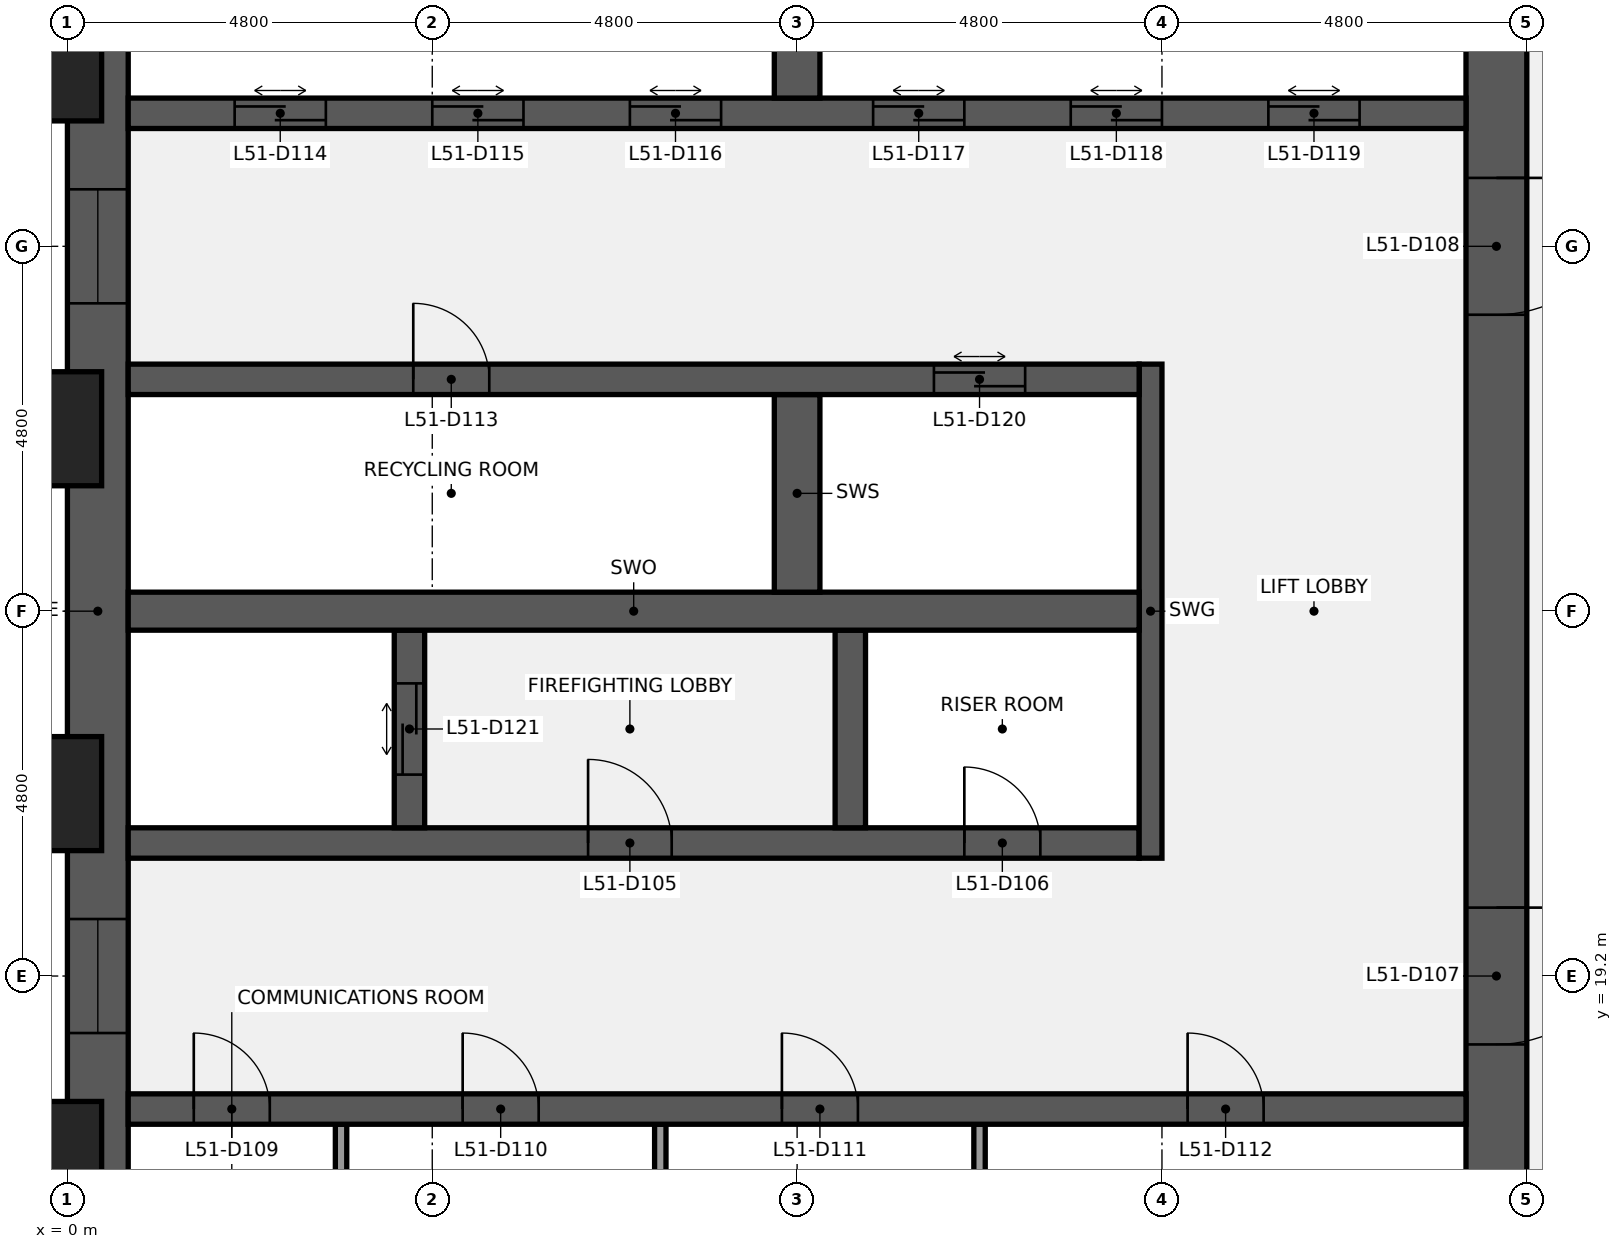
"""IFC4 building model, lengths in metres.
Left out: names, types, materials, properties, quantities, classifications, styles, units other than length and angle.
Written with IfcOpenShell. Run it as: python <this file> out.ifc"""

import sys

from ifc_helpers import new_model, si_unit, direction, frame, frame_2d, origin, origin_2d, place, context, subcontext, project, spatial, rectangle, extrude, element, fill, save


model = new_model("IFC4")
c1 = context("Model", 3, precision=1e-05, world=origin(), true_north=direction((0.0, 1.0)))
c2 = subcontext(c1, "Body", "Model", "MODEL_VIEW")
j1 = project(units=[si_unit("LENGTHUNIT", "METRE"), si_unit("PLANEANGLEUNIT", "RADIAN")], contexts=[c1])
p1 = place(None, origin())
s1 = spatial("IfcSite", under=j1, at=p1, CompositionType="ELEMENT")
p2 = place(p1, origin())
s2 = spatial("IfcBuilding", under=s1, at=p2, CompositionType="ELEMENT")
p3 = place(p2, frame((0.0, 0.0, 233.2)))
s3 = spatial("IfcBuildingStorey", under=s2, at=p3, CompositionType="ELEMENT", Elevation=233.2)
p4 = place(p3, frame((0.4, 9.6, 0.0), z_axis=(0.0, 0.0, 1.0), x_axis=(0.0, 1.0, 0.0)))
e1 = element("IfcWall", 1, at=p4, inside=s3, PredefinedType="SHEAR", context=c2, shape_type="SweptSolid", body=[
    extrude(rectangle(XDim=28.8, YDim=0.8, at=frame_2d((14.4, 0.0))), origin(), (0.0, 0.0, 1.0), 3.84),
])
p5 = place(p4, frame((8.85, 0.0, 0.9)))
e2 = element("IfcOpeningElement", 2, at=p5, cuts=e1, PredefinedType="OPENING", context=c2, shape_type="SweptSolid", body=[
    extrude(rectangle(XDim=1.5, YDim=1.5, at=frame_2d((0.75, 0.75))), frame((0.0, 0.41, 0.0), z_axis=(0.0, -1.0, 0.0), x_axis=(1.0, 0.0, 0.0)), (0.0, 0.0, 1.0), 0.82),
])
p6 = place(p4, frame((18.45, 0.0, 0.9)))
e3 = element("IfcOpeningElement", 3, at=p6, cuts=e1, PredefinedType="OPENING", context=c2, shape_type="SweptSolid", body=[
    extrude(rectangle(XDim=1.5, YDim=1.5, at=frame_2d((0.75, 0.75))), frame((0.0, 0.41, 0.0), z_axis=(0.0, -1.0, 0.0), x_axis=(1.0, 0.0, 0.0)), (0.0, 0.0, 1.0), 0.82),
])
p7 = place(p3, frame((18.8, 38.4, 0.0), z_axis=(0.0, 0.0, 1.0), x_axis=(0.0, -1.0, 0.0)))
e4 = element("IfcWall", 4, at=p7, inside=s3, PredefinedType="SHEAR", context=c2, shape_type="SweptSolid", body=[
    extrude(rectangle(XDim=28.8, YDim=0.8, at=frame_2d((14.4, 0.0))), origin(), (0.0, 0.0, 1.0), 3.84),
])
p8 = place(p7, frame((18.3, 0.0, 0.0)))
e5 = element("IfcOpeningElement", 5, at=p8, cuts=e4, PredefinedType="OPENING", context=c2, shape_type="SweptSolid", body=[
    extrude(rectangle(XDim=1.8, YDim=2.1, at=frame_2d((0.9, 1.05))), frame((0.0, 0.41, 0.0), z_axis=(0.0, -1.0, 0.0), x_axis=(1.0, 0.0, 0.0)), (0.0, 0.0, 1.0), 0.82),
])
p9 = place(p7, frame((8.7, 0.0, 0.0)))
e6 = element("IfcOpeningElement", 6, at=p9, cuts=e4, PredefinedType="OPENING", context=c2, shape_type="SweptSolid", body=[
    extrude(rectangle(XDim=1.8, YDim=2.1, at=frame_2d((0.9, 1.05))), frame((0.0, 0.41, 0.0), z_axis=(0.0, -1.0, 0.0), x_axis=(1.0, 0.0, 0.0)), (0.0, 0.0, 1.0), 0.82),
])
for number, where, z_axis, x_axis in (
    (7, (3.6, 14.65, 0.0), (0.0, 0.0, 1.0), (0.0, 1.0, 0.0)),
    (8, (7.8, 14.65, 0.0), (0.0, 0.0, 1.0), (0.0, 1.0, 0.0)),
    (9, (12.0, 14.65, 0.0), (0.0, 0.0, 1.0), (0.0, 1.0, 0.0)),
):
    element("IfcWall", number, at=place(p3, frame(where, z_axis=z_axis, x_axis=x_axis)), inside=s3, PredefinedType="PARTITIONING", context=c2, shape_type="SweptSolid", body=[
        extrude(rectangle(XDim=2.6, YDim=0.15, at=frame_2d((1.3, 0.0))), origin(), (0.0, 0.0, 1.0), 3.84),
    ])
p10 = place(p3, frame((0.8, 17.45, 0.0), z_axis=(0.0, 0.0, 1.0), x_axis=(1.0, 0.0, 0.0)))
e10 = element("IfcWall", 10, at=p10, inside=s3, PredefinedType="SHEAR", context=c2, shape_type="SweptSolid", body=[
    extrude(rectangle(XDim=17.6, YDim=0.4, at=frame_2d((8.8, 0.0))), origin(), (0.0, 0.0, 1.0), 3.84),
])
p11 = place(p10, frame((0.863, 0.0, 0.0)))
e11 = element("IfcOpeningElement", 11, at=p11, cuts=e10, PredefinedType="OPENING", context=c2, shape_type="SweptSolid", body=[
    extrude(rectangle(XDim=1.0, YDim=2.1, at=frame_2d((0.5, 1.05))), frame((0.0, 0.21, 0.0), z_axis=(0.0, -1.0, 0.0), x_axis=(1.0, 0.0, 0.0)), (0.0, 0.0, 1.0), 0.42),
])
p12 = place(p10, frame((4.4, 0.0, 0.0)))
e12 = element("IfcOpeningElement", 12, at=p12, cuts=e10, PredefinedType="OPENING", context=c2, shape_type="SweptSolid", body=[
    extrude(rectangle(XDim=1.0, YDim=2.1, at=frame_2d((0.5, 1.05))), frame((0.0, 0.21, 0.0), z_axis=(0.0, -1.0, 0.0), x_axis=(1.0, 0.0, 0.0)), (0.0, 0.0, 1.0), 0.42),
])
p13 = place(p10, frame((8.6, 0.0, 0.0)))
e13 = element("IfcOpeningElement", 13, at=p13, cuts=e10, PredefinedType="OPENING", context=c2, shape_type="SweptSolid", body=[
    extrude(rectangle(XDim=1.0, YDim=2.1, at=frame_2d((0.5, 1.05))), frame((0.0, 0.21, 0.0), z_axis=(0.0, -1.0, 0.0), x_axis=(1.0, 0.0, 0.0)), (0.0, 0.0, 1.0), 0.42),
])
p14 = place(p10, frame((13.938, 0.0, 0.0)))
e14 = element("IfcOpeningElement", 14, at=p14, cuts=e10, PredefinedType="OPENING", context=c2, shape_type="SweptSolid", body=[
    extrude(rectangle(XDim=1.0, YDim=2.1, at=frame_2d((0.5, 1.05))), frame((0.0, 0.21, 0.0), z_axis=(0.0, -1.0, 0.0), x_axis=(1.0, 0.0, 0.0)), (0.0, 0.0, 1.0), 0.42),
])
p15 = place(p3, frame((0.8, 20.95, 0.0), z_axis=(0.0, 0.0, 1.0), x_axis=(1.0, 0.0, 0.0)))
e15 = element("IfcWall", 15, at=p15, inside=s3, PredefinedType="SHEAR", context=c2, shape_type="SweptSolid", body=[
    extrude(rectangle(XDim=13.3, YDim=0.4, at=frame_2d((6.65, 0.0))), origin(), (0.0, 0.0, 1.0), 3.84),
])
p16 = place(p15, frame((6.05, 0.0, 0.0)))
e16 = element("IfcOpeningElement", 16, at=p16, cuts=e15, PredefinedType="OPENING", context=c2, shape_type="SweptSolid", body=[
    extrude(rectangle(XDim=1.1, YDim=2.1, at=frame_2d((0.55, 1.05))), frame((0.0, 0.21, 0.0), z_axis=(0.0, -1.0, 0.0), x_axis=(1.0, 0.0, 0.0)), (0.0, 0.0, 1.0), 0.42),
])
p17 = place(p15, frame((11.0, 0.0, 0.0)))
e17 = element("IfcOpeningElement", 17, at=p17, cuts=e15, PredefinedType="OPENING", context=c2, shape_type="SweptSolid", body=[
    extrude(rectangle(XDim=1.0, YDim=2.1, at=frame_2d((0.5, 1.05))), frame((0.0, 0.21, 0.0), z_axis=(0.0, -1.0, 0.0), x_axis=(1.0, 0.0, 0.0)), (0.0, 0.0, 1.0), 0.42),
])
p18 = place(p3, frame((14.25, 20.75, 0.0), z_axis=(0.0, 0.0, 1.0), x_axis=(0.0, 1.0, 0.0)))
e18 = element("IfcWall", 18, at=p18, inside=s3, PredefinedType="SHEAR", context=c2, shape_type="SweptSolid", body=[
    extrude(rectangle(XDim=6.5, YDim=0.3, at=frame_2d((3.25, 0.0))), origin(), (0.0, 0.0, 1.0), 3.84),
])
p19 = place(p3, frame((4.5, 21.15, 0.0), z_axis=(0.0, 0.0, 1.0), x_axis=(0.0, 1.0, 0.0)))
e19 = element("IfcWall", 19, at=p19, inside=s3, PredefinedType="SHEAR", context=c2, shape_type="SweptSolid", body=[
    extrude(rectangle(XDim=2.6, YDim=0.4, at=frame_2d((1.3, 0.0))), origin(), (0.0, 0.0, 1.0), 3.84),
])
p20 = place(p19, frame((0.7, 0.0, 0.0)))
e20 = element("IfcOpeningElement", 20, at=p20, cuts=e19, PredefinedType="OPENING", context=c2, shape_type="SweptSolid", body=[
    extrude(rectangle(XDim=1.2, YDim=2.1, at=frame_2d((0.6, 1.05))), frame((0.0, 0.21, 0.0), z_axis=(0.0, -1.0, 0.0), x_axis=(1.0, 0.0, 0.0)), (0.0, 0.0, 1.0), 0.42),
])
p21 = place(p3, frame((10.3, 21.15, 0.0), z_axis=(0.0, 0.0, 1.0), x_axis=(0.0, 1.0, 0.0)))
e21 = element("IfcWall", 21, at=p21, inside=s3, PredefinedType="SHEAR", context=c2, shape_type="SweptSolid", body=[
    extrude(rectangle(XDim=2.6, YDim=0.4, at=frame_2d((1.3, 0.0))), origin(), (0.0, 0.0, 1.0), 3.84),
])
p22 = place(p3, frame((0.8, 24.0, 0.0), z_axis=(0.0, 0.0, 1.0), x_axis=(1.0, 0.0, 0.0)))
e22 = element("IfcWall", 22, at=p22, inside=s3, PredefinedType="SHEAR", context=c2, shape_type="SweptSolid", body=[
    extrude(rectangle(XDim=13.3, YDim=0.5, at=frame_2d((6.65, 0.0))), origin(), (0.0, 0.0, 1.0), 3.84),
])
p23 = place(p3, frame((9.6, 24.25, 0.0), z_axis=(0.0, 0.0, 1.0), x_axis=(0.0, 1.0, 0.0)))
e23 = element("IfcWall", 23, at=p23, inside=s3, PredefinedType="SHEAR", context=c2, shape_type="SweptSolid", body=[
    extrude(rectangle(XDim=2.6, YDim=0.6, at=frame_2d((1.3, 0.0))), origin(), (0.0, 0.0, 1.0), 3.84),
])
p24 = place(p3, frame((0.8, 27.05, 0.0), z_axis=(0.0, 0.0, 1.0), x_axis=(1.0, 0.0, 0.0)))
e24 = element("IfcWall", 24, at=p24, inside=s3, PredefinedType="SHEAR", context=c2, shape_type="SweptSolid", body=[
    extrude(rectangle(XDim=13.3, YDim=0.4, at=frame_2d((6.65, 0.0))), origin(), (0.0, 0.0, 1.0), 3.84),
])
p25 = place(p24, frame((3.75, 0.0, 0.0)))
e25 = element("IfcOpeningElement", 25, at=p25, cuts=e24, PredefinedType="OPENING", context=c2, shape_type="SweptSolid", body=[
    extrude(rectangle(XDim=1.0, YDim=2.1, at=frame_2d((0.5, 1.05))), frame((0.0, 0.21, 0.0), z_axis=(0.0, -1.0, 0.0), x_axis=(1.0, 0.0, 0.0)), (0.0, 0.0, 1.0), 0.42),
])
p26 = place(p24, frame((10.6, 0.0, 0.0)))
e26 = element("IfcOpeningElement", 26, at=p26, cuts=e24, PredefinedType="OPENING", context=c2, shape_type="SweptSolid", body=[
    extrude(rectangle(XDim=1.2, YDim=2.1, at=frame_2d((0.6, 1.05))), frame((0.0, 0.21, 0.0), z_axis=(0.0, -1.0, 0.0), x_axis=(1.0, 0.0, 0.0)), (0.0, 0.0, 1.0), 0.42),
])
p27 = place(p3, frame((0.8, 30.55, 0.0), z_axis=(0.0, 0.0, 1.0), x_axis=(1.0, 0.0, 0.0)))
e27 = element("IfcWall", 27, at=p27, inside=s3, PredefinedType="SHEAR", context=c2, shape_type="SweptSolid", body=[
    extrude(rectangle(XDim=17.6, YDim=0.4, at=frame_2d((8.8, 0.0))), origin(), (0.0, 0.0, 1.0), 3.84),
])
p28 = place(p27, frame((1.4, 0.0, 0.0)))
e28 = element("IfcOpeningElement", 28, at=p28, cuts=e27, PredefinedType="OPENING", context=c2, shape_type="SweptSolid", body=[
    extrude(rectangle(XDim=1.2, YDim=2.1, at=frame_2d((0.6, 1.05))), frame((0.0, 0.21, 0.0), z_axis=(0.0, -1.0, 0.0), x_axis=(1.0, 0.0, 0.0)), (0.0, 0.0, 1.0), 0.42),
])
p29 = place(p27, frame((4.0, 0.0, 0.0)))
e29 = element("IfcOpeningElement", 29, at=p29, cuts=e27, PredefinedType="OPENING", context=c2, shape_type="SweptSolid", body=[
    extrude(rectangle(XDim=1.2, YDim=2.1, at=frame_2d((0.6, 1.05))), frame((0.0, 0.21, 0.0), z_axis=(0.0, -1.0, 0.0), x_axis=(1.0, 0.0, 0.0)), (0.0, 0.0, 1.0), 0.42),
])
p30 = place(p27, frame((6.6, 0.0, 0.0)))
e30 = element("IfcOpeningElement", 30, at=p30, cuts=e27, PredefinedType="OPENING", context=c2, shape_type="SweptSolid", body=[
    extrude(rectangle(XDim=1.2, YDim=2.1, at=frame_2d((0.6, 1.05))), frame((0.0, 0.21, 0.0), z_axis=(0.0, -1.0, 0.0), x_axis=(1.0, 0.0, 0.0)), (0.0, 0.0, 1.0), 0.42),
])
p31 = place(p27, frame((9.8, 0.0, 0.0)))
e31 = element("IfcOpeningElement", 31, at=p31, cuts=e27, PredefinedType="OPENING", context=c2, shape_type="SweptSolid", body=[
    extrude(rectangle(XDim=1.2, YDim=2.1, at=frame_2d((0.6, 1.05))), frame((0.0, 0.21, 0.0), z_axis=(0.0, -1.0, 0.0), x_axis=(1.0, 0.0, 0.0)), (0.0, 0.0, 1.0), 0.42),
])
p32 = place(p27, frame((12.4, 0.0, 0.0)))
e32 = element("IfcOpeningElement", 32, at=p32, cuts=e27, PredefinedType="OPENING", context=c2, shape_type="SweptSolid", body=[
    extrude(rectangle(XDim=1.2, YDim=2.1, at=frame_2d((0.6, 1.05))), frame((0.0, 0.21, 0.0), z_axis=(0.0, -1.0, 0.0), x_axis=(1.0, 0.0, 0.0)), (0.0, 0.0, 1.0), 0.42),
])
p33 = place(p27, frame((15.0, 0.0, 0.0)))
e33 = element("IfcOpeningElement", 33, at=p33, cuts=e27, PredefinedType="OPENING", context=c2, shape_type="SweptSolid", body=[
    extrude(rectangle(XDim=1.2, YDim=2.1, at=frame_2d((0.6, 1.05))), frame((0.0, 0.21, 0.0), z_axis=(0.0, -1.0, 0.0), x_axis=(1.0, 0.0, 0.0)), (0.0, 0.0, 1.0), 0.42),
])
p34 = place(p3, frame((9.6, 30.75, 0.0), z_axis=(0.0, 0.0, 1.0), x_axis=(0.0, 1.0, 0.0)))
e34 = element("IfcWall", 34, at=p34, inside=s3, PredefinedType="SHEAR", context=c2, shape_type="SweptSolid", body=[
    extrude(rectangle(XDim=2.6, YDim=0.6, at=frame_2d((1.3, 0.0))), origin(), (0.0, 0.0, 1.0), 3.84),
])
for number, where, z_axis, x_axis in (
    (35, (-0.75, 16.8, 0.0), (0.0, 0.0, 1.0), (0.0, 1.0, 0.0)),
    (36, (-0.75, 21.6, 0.0), (0.0, 0.0, 1.0), (0.0, 1.0, 0.0)),
    (37, (-0.75, 26.4, 0.0), (0.0, 0.0, 1.0), (0.0, 1.0, 0.0)),
    (38, (-0.75, 31.2, 0.0), (0.0, 0.0, 1.0), (0.0, 1.0, 0.0)),
):
    element("IfcColumn", number, at=place(p3, frame(where, z_axis=z_axis, x_axis=x_axis)), inside=s3, PredefinedType="PILASTER", context=c2, shape_type="SweptSolid", body=[
        extrude(rectangle(XDim=2.4, YDim=1.5, at=origin_2d()), origin(), (0.0, 0.0, 1.0), 4.0),
    ])
p35 = place(p16, origin())
e39 = element("IfcDoor", 39, at=p35, inside=s3, OperationType="SINGLE_SWING_LEFT", PredefinedType="DOOR", context=c2, shape_type="SweptSolid", body=[
    extrude(rectangle(XDim=1.1, YDim=2.1, at=frame_2d((0.55, 1.05))), frame((0.0, 0.025, 0.0), z_axis=(0.0, -1.0, 0.0), x_axis=(1.0, 0.0, 0.0)), (0.0, 0.0, 1.0), 0.05),
])
fill(e16, e39)
p36 = place(p17, origin())
e40 = element("IfcDoor", 40, at=p36, inside=s3, OperationType="SINGLE_SWING_LEFT", PredefinedType="DOOR", context=c2, shape_type="SweptSolid", body=[
    extrude(rectangle(XDim=1.0, YDim=2.1, at=frame_2d((0.5, 1.05))), frame((0.0, 0.025, 0.0), z_axis=(0.0, -1.0, 0.0), x_axis=(1.0, 0.0, 0.0)), (0.0, 0.0, 1.0), 0.05),
])
fill(e17, e40)
p37 = place(p8, origin())
e41 = element("IfcDoor", 41, at=p37, inside=s3, OperationType="DOUBLE_DOOR_SINGLE_SWING", PredefinedType="DOOR", context=c2, shape_type="SweptSolid", body=[
    extrude(rectangle(XDim=1.8, YDim=2.1, at=frame_2d((0.9, 1.05))), frame((0.0, 0.025, 0.0), z_axis=(0.0, -1.0, 0.0), x_axis=(1.0, 0.0, 0.0)), (0.0, 0.0, 1.0), 0.05),
])
fill(e5, e41)
p38 = place(p9, origin())
e42 = element("IfcDoor", 42, at=p38, inside=s3, OperationType="DOUBLE_DOOR_SINGLE_SWING", PredefinedType="DOOR", context=c2, shape_type="SweptSolid", body=[
    extrude(rectangle(XDim=1.8, YDim=2.1, at=frame_2d((0.9, 1.05))), frame((0.0, 0.025, 0.0), z_axis=(0.0, -1.0, 0.0), x_axis=(1.0, 0.0, 0.0)), (0.0, 0.0, 1.0), 0.05),
])
fill(e6, e42)
p39 = place(p11, origin())
e43 = element("IfcDoor", 43, at=p39, inside=s3, OperationType="SINGLE_SWING_LEFT", PredefinedType="DOOR", context=c2, shape_type="SweptSolid", body=[
    extrude(rectangle(XDim=1.0, YDim=2.1, at=frame_2d((0.5, 1.05))), frame((0.0, 0.025, 0.0), z_axis=(0.0, -1.0, 0.0), x_axis=(1.0, 0.0, 0.0)), (0.0, 0.0, 1.0), 0.05),
])
fill(e11, e43)
p40 = place(p12, origin())
e44 = element("IfcDoor", 44, at=p40, inside=s3, OperationType="SINGLE_SWING_LEFT", PredefinedType="DOOR", context=c2, shape_type="SweptSolid", body=[
    extrude(rectangle(XDim=1.0, YDim=2.1, at=frame_2d((0.5, 1.05))), frame((0.0, 0.025, 0.0), z_axis=(0.0, -1.0, 0.0), x_axis=(1.0, 0.0, 0.0)), (0.0, 0.0, 1.0), 0.05),
])
fill(e12, e44)
p41 = place(p13, origin())
e45 = element("IfcDoor", 45, at=p41, inside=s3, OperationType="SINGLE_SWING_LEFT", PredefinedType="DOOR", context=c2, shape_type="SweptSolid", body=[
    extrude(rectangle(XDim=1.0, YDim=2.1, at=frame_2d((0.5, 1.05))), frame((0.0, 0.025, 0.0), z_axis=(0.0, -1.0, 0.0), x_axis=(1.0, 0.0, 0.0)), (0.0, 0.0, 1.0), 0.05),
])
fill(e13, e45)
p42 = place(p14, origin())
e46 = element("IfcDoor", 46, at=p42, inside=s3, OperationType="SINGLE_SWING_LEFT", PredefinedType="DOOR", context=c2, shape_type="SweptSolid", body=[
    extrude(rectangle(XDim=1.0, YDim=2.1, at=frame_2d((0.5, 1.05))), frame((0.0, 0.025, 0.0), z_axis=(0.0, -1.0, 0.0), x_axis=(1.0, 0.0, 0.0)), (0.0, 0.0, 1.0), 0.05),
])
fill(e14, e46)
p43 = place(p25, origin())
e47 = element("IfcDoor", 47, at=p43, inside=s3, OperationType="SINGLE_SWING_LEFT", PredefinedType="DOOR", context=c2, shape_type="SweptSolid", body=[
    extrude(rectangle(XDim=1.0, YDim=2.1, at=frame_2d((0.5, 1.05))), frame((0.0, 0.025, 0.0), z_axis=(0.0, -1.0, 0.0), x_axis=(1.0, 0.0, 0.0)), (0.0, 0.0, 1.0), 0.05),
])
fill(e25, e47)
p44 = place(p28, origin())
e48 = element("IfcDoor", 48, at=p44, inside=s3, OperationType="DOUBLE_DOOR_SLIDING", PredefinedType="DOOR", context=c2, shape_type="SweptSolid", body=[
    extrude(rectangle(XDim=1.2, YDim=2.1, at=frame_2d((0.6, 1.05))), frame((0.0, 0.025, 0.0), z_axis=(0.0, -1.0, 0.0), x_axis=(1.0, 0.0, 0.0)), (0.0, 0.0, 1.0), 0.05),
])
fill(e28, e48)
p45 = place(p29, origin())
e49 = element("IfcDoor", 49, at=p45, inside=s3, OperationType="DOUBLE_DOOR_SLIDING", PredefinedType="DOOR", context=c2, shape_type="SweptSolid", body=[
    extrude(rectangle(XDim=1.2, YDim=2.1, at=frame_2d((0.6, 1.05))), frame((0.0, 0.025, 0.0), z_axis=(0.0, -1.0, 0.0), x_axis=(1.0, 0.0, 0.0)), (0.0, 0.0, 1.0), 0.05),
])
fill(e29, e49)
p46 = place(p30, origin())
e50 = element("IfcDoor", 50, at=p46, inside=s3, OperationType="DOUBLE_DOOR_SLIDING", PredefinedType="DOOR", context=c2, shape_type="SweptSolid", body=[
    extrude(rectangle(XDim=1.2, YDim=2.1, at=frame_2d((0.6, 1.05))), frame((0.0, 0.025, 0.0), z_axis=(0.0, -1.0, 0.0), x_axis=(1.0, 0.0, 0.0)), (0.0, 0.0, 1.0), 0.05),
])
fill(e30, e50)
p47 = place(p31, origin())
e51 = element("IfcDoor", 51, at=p47, inside=s3, OperationType="DOUBLE_DOOR_SLIDING", PredefinedType="DOOR", context=c2, shape_type="SweptSolid", body=[
    extrude(rectangle(XDim=1.2, YDim=2.1, at=frame_2d((0.6, 1.05))), frame((0.0, 0.025, 0.0), z_axis=(0.0, -1.0, 0.0), x_axis=(1.0, 0.0, 0.0)), (0.0, 0.0, 1.0), 0.05),
])
fill(e31, e51)
p48 = place(p32, origin())
e52 = element("IfcDoor", 52, at=p48, inside=s3, OperationType="DOUBLE_DOOR_SLIDING", PredefinedType="DOOR", context=c2, shape_type="SweptSolid", body=[
    extrude(rectangle(XDim=1.2, YDim=2.1, at=frame_2d((0.6, 1.05))), frame((0.0, 0.025, 0.0), z_axis=(0.0, -1.0, 0.0), x_axis=(1.0, 0.0, 0.0)), (0.0, 0.0, 1.0), 0.05),
])
fill(e32, e52)
p49 = place(p33, origin())
e53 = element("IfcDoor", 53, at=p49, inside=s3, OperationType="DOUBLE_DOOR_SLIDING", PredefinedType="DOOR", context=c2, shape_type="SweptSolid", body=[
    extrude(rectangle(XDim=1.2, YDim=2.1, at=frame_2d((0.6, 1.05))), frame((0.0, 0.025, 0.0), z_axis=(0.0, -1.0, 0.0), x_axis=(1.0, 0.0, 0.0)), (0.0, 0.0, 1.0), 0.05),
])
fill(e33, e53)
p50 = place(p26, origin())
e54 = element("IfcDoor", 54, at=p50, inside=s3, OperationType="DOUBLE_DOOR_SLIDING", PredefinedType="DOOR", context=c2, shape_type="SweptSolid", body=[
    extrude(rectangle(XDim=1.2, YDim=2.1, at=frame_2d((0.6, 1.05))), frame((0.0, 0.025, 0.0), z_axis=(0.0, -1.0, 0.0), x_axis=(1.0, 0.0, 0.0)), (0.0, 0.0, 1.0), 0.05),
])
fill(e26, e54)
p51 = place(p20, origin())
e55 = element("IfcDoor", 55, at=p51, inside=s3, OperationType="DOUBLE_DOOR_SLIDING", PredefinedType="DOOR", context=c2, shape_type="SweptSolid", body=[
    extrude(rectangle(XDim=1.2, YDim=2.1, at=frame_2d((0.6, 1.05))), frame((0.0, 0.025, 0.0), z_axis=(0.0, -1.0, 0.0), x_axis=(1.0, 0.0, 0.0)), (0.0, 0.0, 1.0), 0.05),
])
fill(e20, e55)
p52 = place(p5, origin())
e56 = element("IfcWindow", 56, at=p52, inside=s3, PartitioningType="SINGLE_PANEL", PredefinedType="WINDOW", context=c2, shape_type="SweptSolid", body=[
    extrude(rectangle(XDim=1.5, YDim=1.5, at=frame_2d((0.75, 0.75))), frame((0.0, 0.03, 0.0), z_axis=(0.0, -1.0, 0.0), x_axis=(1.0, 0.0, 0.0)), (0.0, 0.0, 1.0), 0.06),
])
fill(e2, e56)
p53 = place(p6, origin())
e57 = element("IfcWindow", 57, at=p53, inside=s3, PartitioningType="SINGLE_PANEL", PredefinedType="WINDOW", context=c2, shape_type="SweptSolid", body=[
    extrude(rectangle(XDim=1.5, YDim=1.5, at=frame_2d((0.75, 0.75))), frame((0.0, 0.03, 0.0), z_axis=(0.0, -1.0, 0.0), x_axis=(1.0, 0.0, 0.0)), (0.0, 0.0, 1.0), 0.06),
])
fill(e3, e57)
save(model, sys.argv[1])
